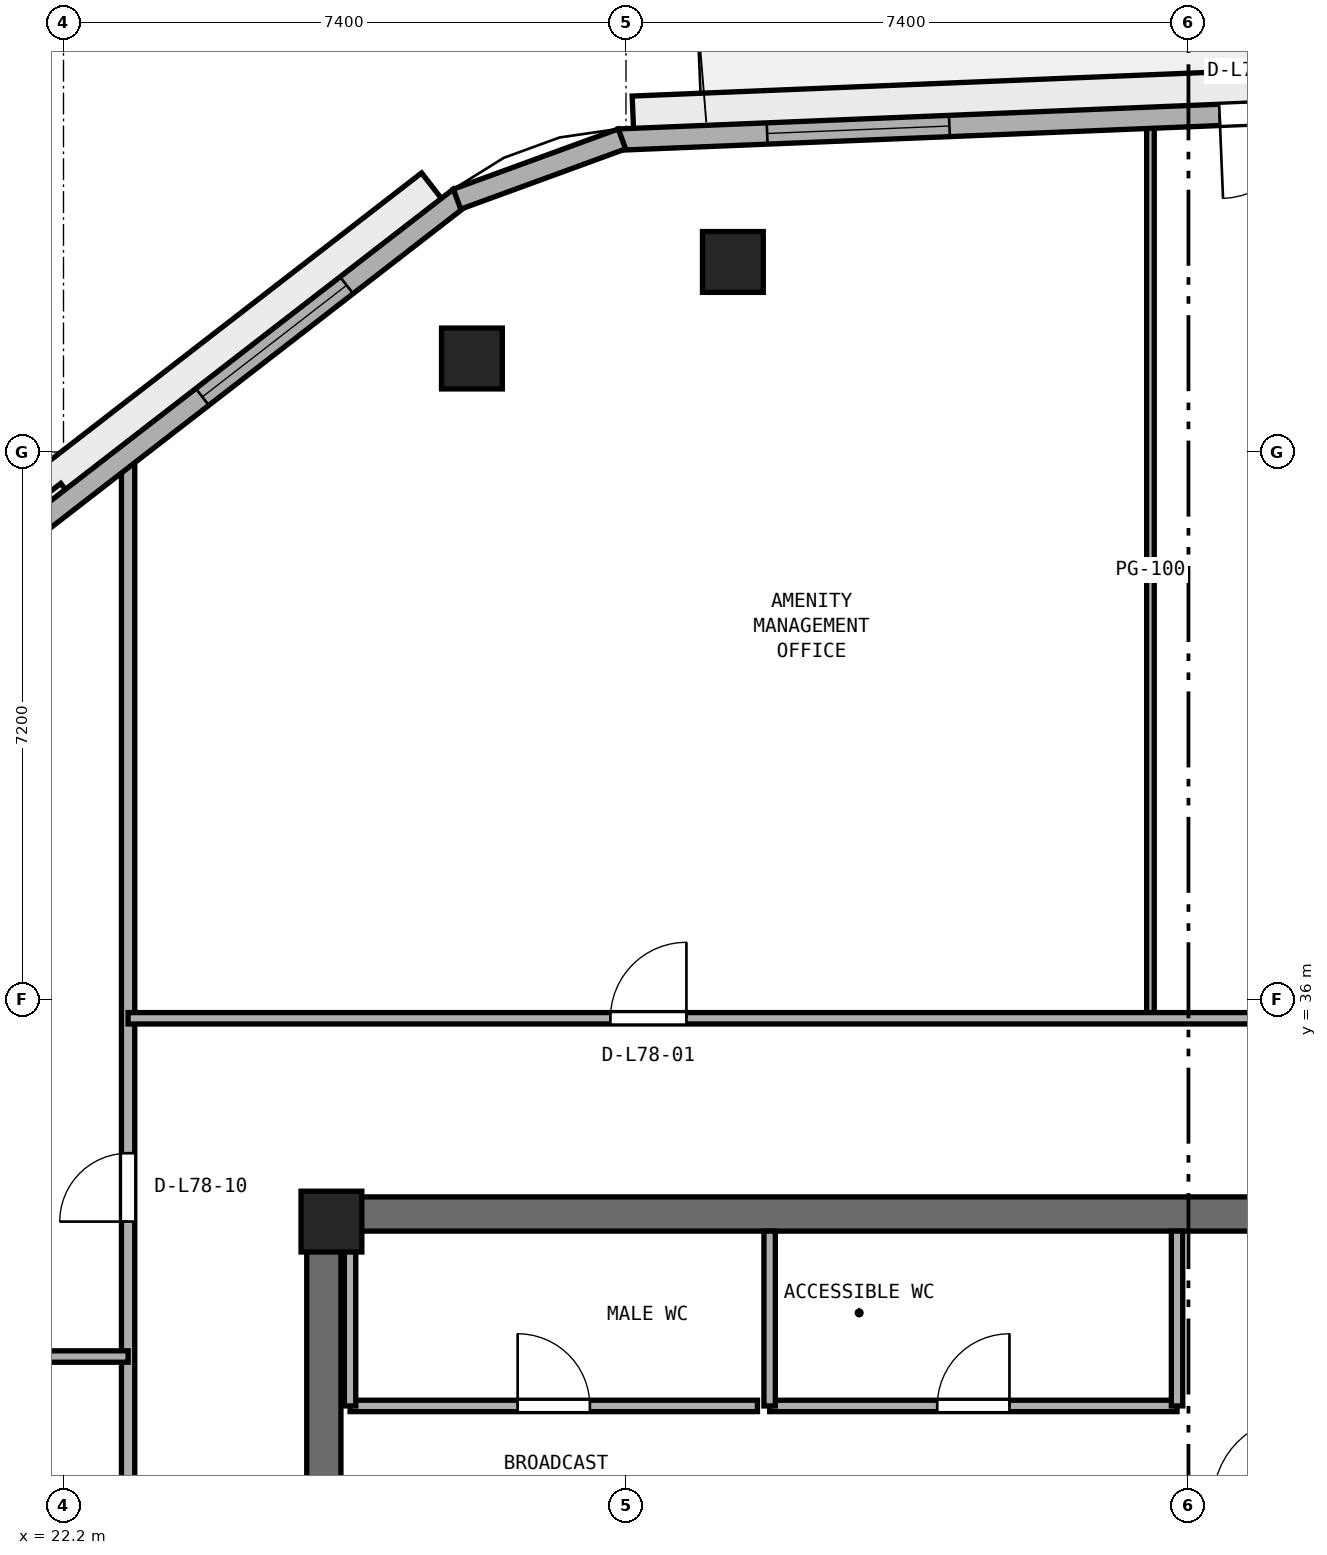
"""IFC4 building model, lengths in metres.
Left out: names, types, materials, properties, quantities, classifications, styles, units other than length and angle.
Written with IfcOpenShell. Run it as: python <this file> out.ifc"""

import sys

from ifc_helpers import new_model, si_unit, direction, frame, frame_2d, origin, origin_2d, place, context, subcontext, project, spatial, rectangle, extrude, element, fill, save


model = new_model("IFC4")
c1 = context("Model", 3, precision=1e-05, world=origin(), true_north=direction((0.0, 1.0)))
c2 = subcontext(c1, "Body", "Model", "MODEL_VIEW")
j1 = project(units=[si_unit("LENGTHUNIT", "METRE"), si_unit("PLANEANGLEUNIT", "RADIAN")], contexts=[c1])
p1 = place(None, origin())
s1 = spatial("IfcSite", under=j1, at=p1, CompositionType="ELEMENT")
p2 = place(p1, origin())
s2 = spatial("IfcBuilding", under=s1, at=p2, CompositionType="ELEMENT")
p3 = place(p2, frame((0.0, 0.0, 304.8)))
s3 = spatial("IfcBuildingStorey", under=s2, at=p3, CompositionType="ELEMENT", Elevation=304.8)
p4 = place(p3, frame((25.4, 33.175, 0.0), z_axis=(0.0, 0.0, 1.0), x_axis=(1.0, 0.0, 0.0)))
e1 = element("IfcWall", 1, at=p4, inside=s3, PredefinedType="SHEAR", context=c2, shape_type="SweptSolid", body=[
    extrude(rectangle(XDim=23.2, YDim=0.45, at=frame_2d((11.6, 0.0))), origin(), (0.0, 0.0, 1.0), 3.4),
])
p5 = place(p3, frame((25.625, 17.45, 0.0), z_axis=(0.0, 0.0, 1.0), x_axis=(0.0, 1.0, 0.0)))
e2 = element("IfcWall", 2, at=p5, inside=s3, PredefinedType="SHEAR", context=c2, shape_type="SweptSolid", body=[
    extrude(rectangle(XDim=15.5, YDim=0.45, at=frame_2d((7.75, 0.0))), origin(), (0.0, 0.0, 1.0), 3.4),
])
p6 = place(p5, frame((7.0, 0.0, 0.0)))
e3 = element("IfcOpeningElement", 3, at=p6, cuts=e2, PredefinedType="OPENING", context=c2, shape_type="SweptSolid", body=[
    extrude(rectangle(XDim=1.5, YDim=2.15, at=frame_2d((0.75, 1.075))), frame((0.0, 0.235, 0.0), z_axis=(0.0, -1.0, 0.0), x_axis=(1.0, 0.0, 0.0)), (0.0, 0.0, 1.0), 0.47),
])
p7 = place(p3, frame((25.725, 33.075, 0.0), z_axis=(0.0, 0.0, 1.0), x_axis=(1.0, 0.0, 0.0)))
e4 = element("IfcColumn", 4, at=p7, inside=s3, PredefinedType="PILASTER", context=c2, shape_type="SweptSolid", body=[
    extrude(rectangle(XDim=0.8, YDim=0.8, at=origin_2d()), origin(), (0.0, 0.0, 1.0), 3.8),
])
for number, where, z_axis, x_axis in (
    (5, (31.007, 45.7, 0.0), (0.0, 0.0, 1.0), (1.0, 0.0, 0.0)),
    (6, (27.573, 44.43, 0.0), (0.0, 0.0, 1.0), (1.0, 0.0, 0.0)),
):
    element("IfcColumn", number, at=place(p3, frame(where, z_axis=z_axis, x_axis=x_axis)), inside=s3, PredefinedType="COLUMN", context=c2, shape_type="SweptSolid", body=[
        extrude(rectangle(XDim=0.8, YDim=0.8, at=origin_2d()), origin(), (0.0, 0.0, 1.0), 3.8),
    ])
p8 = place(p3, frame((25.97, 30.65, 0.0), z_axis=(0.0, 0.0, 1.0), x_axis=(1.0, 0.0, 0.0)))
e7 = element("IfcWall", 7, at=p8, inside=s3, PredefinedType="PARTITIONING", context=c2, shape_type="SweptSolid", body=[
    extrude(rectangle(XDim=5.36, YDim=0.15, at=frame_2d((2.68, 0.0))), origin(), (0.0, 0.0, 1.0), 3.4),
])
p9 = place(p8, frame((2.205, 0.0, 0.0)))
e8 = element("IfcOpeningElement", 8, at=p9, cuts=e7, PredefinedType="OPENING", context=c2, shape_type="SweptSolid", body=[
    extrude(rectangle(XDim=0.95, YDim=2.1, at=frame_2d((0.475, 1.05))), frame((0.0, 0.085, 0.0), z_axis=(0.0, -1.0, 0.0), x_axis=(1.0, 0.0, 0.0)), (0.0, 0.0, 1.0), 0.17),
])
p10 = place(p3, frame((25.97, 30.65, 0.0), z_axis=(0.0, 0.0, 1.0), x_axis=(0.0, 1.0, 0.0)))
e9 = element("IfcWall", 9, at=p10, inside=s3, PredefinedType="PARTITIONING", context=c2, shape_type="SweptSolid", body=[
    extrude(rectangle(XDim=2.3, YDim=0.15, at=frame_2d((1.15, 0.0))), origin(), (0.0, 0.0, 1.0), 2.5),
])
p11 = place(p3, frame((31.49, 30.65, 0.0), z_axis=(0.0, 0.0, 1.0), x_axis=(1.0, 0.0, 0.0)))
e10 = element("IfcWall", 10, at=p11, inside=s3, PredefinedType="PARTITIONING", context=c2, shape_type="SweptSolid", body=[
    extrude(rectangle(XDim=5.36, YDim=0.15, at=frame_2d((2.68, 0.0))), origin(), (0.0, 0.0, 1.0), 3.4),
])
p12 = place(p11, frame((2.205, 0.0, 0.0)))
e11 = element("IfcOpeningElement", 11, at=p12, cuts=e10, PredefinedType="OPENING", context=c2, shape_type="SweptSolid", body=[
    extrude(rectangle(XDim=0.95, YDim=2.1, at=frame_2d((0.475, 1.05))), frame((0.0, 0.085, 0.0), z_axis=(0.0, -1.0, 0.0), x_axis=(1.0, 0.0, 0.0)), (0.0, 0.0, 1.0), 0.17),
])
for number, where, z_axis, x_axis in (
    (12, (31.49, 30.65, 0.0), (0.0, 0.0, 1.0), (0.0, 1.0, 0.0)),
    (13, (36.85, 30.65, 0.0), (0.0, 0.0, 1.0), (0.0, 1.0, 0.0)),
):
    element("IfcWall", number, at=place(p3, frame(where, z_axis=z_axis, x_axis=x_axis)), inside=s3, PredefinedType="PARTITIONING", context=c2, shape_type="SweptSolid", body=[
        extrude(rectangle(XDim=2.3, YDim=0.15, at=frame_2d((1.15, 0.0))), origin(), (0.0, 0.0, 1.0), 3.4),
    ])
p13 = place(p3, frame((36.5, 35.75, 0.0), z_axis=(0.0, 0.0, 1.0), x_axis=(0.0, 1.0, 0.0)))
e14 = element("IfcWall", 14, at=p13, inside=s3, PredefinedType="PARTITIONING", context=c2, shape_type="SweptSolid", body=[
    extrude(rectangle(XDim=11.783, YDim=0.1, at=frame_2d((5.891, 0.0))), origin(), (0.0, 0.0, 1.0), 3.4),
])
p14 = place(p3, frame((23.05, 6.894, 0.0), z_axis=(0.0, 0.0, 1.0), x_axis=(0.0, 1.0, 0.0)))
e15 = element("IfcWall", 15, at=p14, inside=s3, PredefinedType="PARTITIONING", context=c2, shape_type="SweptSolid", body=[
    extrude(rectangle(XDim=36.312, YDim=0.175, at=frame_2d((18.156, 0.0))), origin(), (0.0, 0.0, 1.0), 3.4),
])
p15 = place(p14, frame((9.031, 0.0, 0.0)))
e16 = element("IfcOpeningElement", 16, at=p15, cuts=e15, PredefinedType="OPENING", context=c2, shape_type="SweptSolid", body=[
    extrude(rectangle(XDim=0.9, YDim=2.1, at=frame_2d((0.45, 1.05))), frame((0.0, 0.097, 0.0), z_axis=(0.0, -1.0, 0.0), x_axis=(1.0, 0.0, 0.0)), (0.0, 0.0, 1.0), 0.195),
])
p16 = place(p14, frame((14.056, 0.0, 0.0)))
e17 = element("IfcOpeningElement", 17, at=p16, cuts=e15, PredefinedType="OPENING", context=c2, shape_type="SweptSolid", body=[
    extrude(rectangle(XDim=0.9, YDim=2.1, at=frame_2d((0.45, 1.05))), frame((0.0, 0.097, 0.0), z_axis=(0.0, -1.0, 0.0), x_axis=(1.0, 0.0, 0.0)), (0.0, 0.0, 1.0), 0.195),
])
p17 = place(p14, frame((20.606, 0.0, 0.0)))
e18 = element("IfcOpeningElement", 18, at=p17, cuts=e15, PredefinedType="OPENING", context=c2, shape_type="SweptSolid", body=[
    extrude(rectangle(XDim=1.0, YDim=2.12, at=frame_2d((0.5, 1.06))), frame((0.0, 0.097, 0.0), z_axis=(0.0, -1.0, 0.0), x_axis=(1.0, 0.0, 0.0)), (0.0, 0.0, 1.0), 0.195),
])
p18 = place(p14, frame((26.181, 0.0, 0.0)))
e19 = element("IfcOpeningElement", 19, at=p18, cuts=e15, PredefinedType="OPENING", context=c2, shape_type="SweptSolid", body=[
    extrude(rectangle(XDim=0.9, YDim=2.1, at=frame_2d((0.45, 1.05))), frame((0.0, 0.097, 0.0), z_axis=(0.0, -1.0, 0.0), x_axis=(1.0, 0.0, 0.0)), (0.0, 0.0, 1.0), 0.195),
])
p19 = place(p3, frame((13.005, 31.3, 0.0), z_axis=(0.0, 0.0, 1.0), x_axis=(1.0, 0.0, 0.0)))
e20 = element("IfcWall", 20, at=p19, inside=s3, PredefinedType="PARTITIONING", context=c2, shape_type="SweptSolid", body=[
    extrude(rectangle(XDim=10.045, YDim=0.15, at=frame_2d((5.022, 0.0))), origin(), (0.0, 0.0, 1.0), 3.4),
])
p20 = place(p3, frame((23.05, 35.75, 0.0), z_axis=(0.0, 0.0, 1.0), x_axis=(1.0, 0.0, 0.0)))
e21 = element("IfcWall", 21, at=p20, inside=s3, PredefinedType="PARTITIONING", context=c2, shape_type="SweptSolid", body=[
    extrude(rectangle(XDim=25.55, YDim=0.15, at=frame_2d((12.775, 0.0))), origin(), (0.0, 0.0, 1.0), 3.4),
])
p21 = place(p20, frame((6.345, 0.0, 0.0)))
e22 = element("IfcOpeningElement", 22, at=p21, cuts=e21, PredefinedType="OPENING", context=c2, shape_type="SweptSolid", body=[
    extrude(rectangle(XDim=1.0, YDim=2.12, at=frame_2d((0.5, 1.06))), frame((0.0, 0.085, 0.0), z_axis=(0.0, -1.0, 0.0), x_axis=(1.0, 0.0, 0.0)), (0.0, 0.0, 1.0), 0.17),
])
p22 = place(p20, frame((18.93, 0.0, 0.0)))
e23 = element("IfcOpeningElement", 23, at=p22, cuts=e21, PredefinedType="OPENING", context=c2, shape_type="SweptSolid", body=[
    extrude(rectangle(XDim=0.9, YDim=2.1, at=frame_2d((0.45, 1.05))), frame((0.0, 0.085, 0.0), z_axis=(0.0, -1.0, 0.0), x_axis=(1.0, 0.0, 0.0)), (0.0, 0.0, 1.0), 0.17),
])
p23 = place(p3, frame((46.414, 48.005, 0.0), z_axis=(0.0, 0.0, 1.0), x_axis=(-0.999156194126, -0.041071885021, 0.0)))
e24 = element("IfcWall", 24, at=p23, inside=s3, PredefinedType="STANDARD", context=c2, shape_type="SweptSolid", body=[
    extrude(rectangle(XDim=16.923, YDim=0.28, at=frame_2d((8.461, 0.0))), origin(), (0.0, 0.0, 1.0), 3.4),
])
p24 = place(p23, frame((7.912, 0.0, 0.0)))
e25 = element("IfcOpeningElement", 25, at=p24, cuts=e24, PredefinedType="OPENING", context=c2, shape_type="SweptSolid", body=[
    extrude(rectangle(XDim=1.1, YDim=2.2, at=frame_2d((0.55, 1.1))), frame((0.0, 0.15, 0.0), z_axis=(0.0, -1.0, 0.0), x_axis=(1.0, 0.0, 0.0)), (0.0, 0.0, 1.0), 0.3),
])
p25 = place(p23, frame((1.954, 0.0, 0.9)))
e26 = element("IfcOpeningElement", 26, at=p25, cuts=e24, PredefinedType="OPENING", context=c2, shape_type="SweptSolid", body=[
    extrude(rectangle(XDim=2.4, YDim=1.75, at=frame_2d((1.2, 0.875))), frame((0.0, 0.15, 0.0), z_axis=(0.0, -1.0, 0.0), x_axis=(1.0, 0.0, 0.0)), (0.0, 0.0, 1.0), 0.3),
])
p26 = place(p23, frame((12.569, 0.0, 0.9)))
e27 = element("IfcOpeningElement", 27, at=p26, cuts=e24, PredefinedType="OPENING", context=c2, shape_type="SweptSolid", body=[
    extrude(rectangle(XDim=2.4, YDim=1.75, at=frame_2d((1.2, 0.875))), frame((0.0, 0.15, 0.0), z_axis=(0.0, -1.0, 0.0), x_axis=(1.0, 0.0, 0.0)), (0.0, 0.0, 1.0), 0.3),
])
p27 = place(p3, frame((27.415, 46.547, 0.0), z_axis=(0.0, 0.0, 1.0), x_axis=(-0.790789745248, -0.612087884875, 0.0)))
e28 = element("IfcWall", 28, at=p27, inside=s3, PredefinedType="STANDARD", context=c2, shape_type="SweptSolid", body=[
    extrude(rectangle(XDim=16.509, YDim=0.28, at=frame_2d((8.254, 0.0))), origin(), (0.0, 0.0, 1.0), 3.4),
])
p28 = place(p27, frame((1.885, 0.0, 0.9)))
e29 = element("IfcOpeningElement", 29, at=p28, cuts=e28, PredefinedType="OPENING", context=c2, shape_type="SweptSolid", body=[
    extrude(rectangle(XDim=2.4, YDim=1.75, at=frame_2d((1.2, 0.875))), frame((0.0, 0.15, 0.0), z_axis=(0.0, -1.0, 0.0), x_axis=(1.0, 0.0, 0.0)), (0.0, 0.0, 1.0), 0.3),
])
p29 = place(p27, frame((7.055, 0.0, 0.9)))
e30 = element("IfcOpeningElement", 30, at=p29, cuts=e28, PredefinedType="OPENING", context=c2, shape_type="SweptSolid", body=[
    extrude(rectangle(XDim=2.4, YDim=1.75, at=frame_2d((1.2, 0.875))), frame((0.0, 0.15, 0.0), z_axis=(0.0, -1.0, 0.0), x_axis=(1.0, 0.0, 0.0)), (0.0, 0.0, 1.0), 0.3),
])
p30 = place(p27, frame((12.224, 0.0, 0.9)))
e31 = element("IfcOpeningElement", 31, at=p30, cuts=e28, PredefinedType="OPENING", context=c2, shape_type="SweptSolid", body=[
    extrude(rectangle(XDim=2.4, YDim=1.75, at=frame_2d((1.2, 0.875))), frame((0.0, 0.15, 0.0), z_axis=(0.0, -1.0, 0.0), x_axis=(1.0, 0.0, 0.0)), (0.0, 0.0, 1.0), 0.3),
])
p31 = place(p3, frame((29.547, 47.318, 0.0), z_axis=(0.0, 0.0, 1.0), x_axis=(-0.93940703724, -0.342803760748, 0.0)))
e32 = element("IfcWall", 32, at=p31, inside=s3, PredefinedType="STANDARD", context=c2, shape_type="SweptSolid", body=[
    extrude(rectangle(XDim=2.31, YDim=0.28, at=frame_2d((1.155, 0.0))), origin(), (0.0, 0.0, 1.0), 3.4),
])
p32 = place(p9, origin())
e33 = element("IfcDoor", 33, at=p32, inside=s3, OperationType="SINGLE_SWING_LEFT", PredefinedType="DOOR", context=c2, shape_type="SweptSolid", body=[
    extrude(rectangle(XDim=0.95, YDim=2.1, at=frame_2d((0.475, 1.05))), frame((0.0, 0.025, 0.0), z_axis=(0.0, -1.0, 0.0), x_axis=(1.0, 0.0, 0.0)), (0.0, 0.0, 1.0), 0.05),
])
fill(e8, e33)
p33 = place(p12, origin())
e34 = element("IfcDoor", 34, at=p33, inside=s3, OperationType="SINGLE_SWING_RIGHT", PredefinedType="DOOR", context=c2, shape_type="SweptSolid", body=[
    extrude(rectangle(XDim=0.95, YDim=2.1, at=frame_2d((0.475, 1.05))), frame((0.0, 0.025, 0.0), z_axis=(0.0, -1.0, 0.0), x_axis=(1.0, 0.0, 0.0)), (0.0, 0.0, 1.0), 0.05),
])
fill(e11, e34)
p34 = place(p21, origin())
e35 = element("IfcDoor", 35, at=p34, inside=s3, OperationType="SINGLE_SWING_RIGHT", PredefinedType="DOOR", context=c2, shape_type="SweptSolid", body=[
    extrude(rectangle(XDim=1.0, YDim=2.12, at=frame_2d((0.5, 1.06))), frame((0.0, 0.025, 0.0), z_axis=(0.0, -1.0, 0.0), x_axis=(1.0, 0.0, 0.0)), (0.0, 0.0, 1.0), 0.05),
])
fill(e22, e35)
p35 = place(p18, origin())
e36 = element("IfcDoor", 36, at=p35, inside=s3, OperationType="SINGLE_SWING_LEFT", PredefinedType="DOOR", context=c2, shape_type="SweptSolid", body=[
    extrude(rectangle(XDim=0.9, YDim=2.1, at=frame_2d((0.45, 1.05))), frame((0.0, 0.025, 0.0), z_axis=(0.0, -1.0, 0.0), x_axis=(1.0, 0.0, 0.0)), (0.0, 0.0, 1.0), 0.05),
])
fill(e19, e36)
p36 = place(p24, origin())
e37 = element("IfcDoor", 37, at=p36, inside=s3, OperationType="SINGLE_SWING_RIGHT", PredefinedType="DOOR", context=c2, shape_type="SweptSolid", body=[
    extrude(rectangle(XDim=1.1, YDim=2.2, at=frame_2d((0.55, 1.1))), frame((0.0, 0.025, 0.0), z_axis=(0.0, -1.0, 0.0), x_axis=(1.0, 0.0, 0.0)), (0.0, 0.0, 1.0), 0.05),
])
fill(e25, e37)
p37 = place(p26, origin())
e38 = element("IfcWindow", 38, at=p37, inside=s3, PartitioningType="SINGLE_PANEL", PredefinedType="WINDOW", context=c2, shape_type="SweptSolid", body=[
    extrude(rectangle(XDim=2.4, YDim=1.75, at=frame_2d((1.2, 0.875))), frame((0.0, 0.03, 0.0), z_axis=(0.0, -1.0, 0.0), x_axis=(1.0, 0.0, 0.0)), (0.0, 0.0, 1.0), 0.06),
])
fill(e27, e38)
p38 = place(p28, origin())
e39 = element("IfcWindow", 39, at=p38, inside=s3, PartitioningType="SINGLE_PANEL", PredefinedType="WINDOW", context=c2, shape_type="SweptSolid", body=[
    extrude(rectangle(XDim=2.4, YDim=1.75, at=frame_2d((1.2, 0.875))), frame((0.0, 0.03, 0.0), z_axis=(0.0, -1.0, 0.0), x_axis=(1.0, 0.0, 0.0)), (0.0, 0.0, 1.0), 0.06),
])
fill(e29, e39)
save(model, sys.argv[1])
